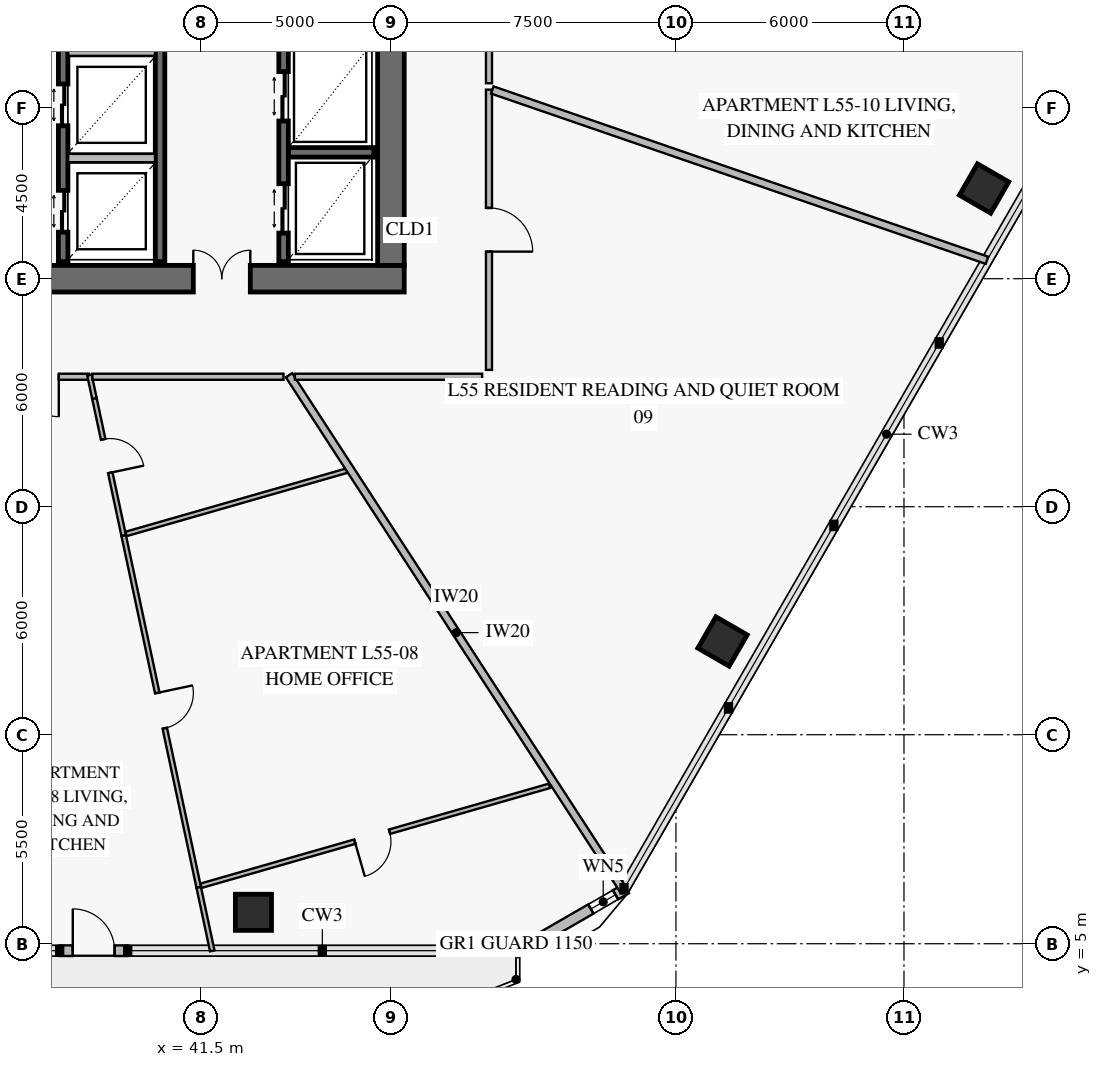
"""IFC4 building model, lengths in metres.
Left out: names, types, materials, properties, quantities, classifications, styles, units other than length and angle.
Written with IfcOpenShell. Run it as: python <this file> out.ifc"""

import sys

from ifc_helpers import new_model, si_unit, direction, frame, frame_2d, origin, origin_2d, place, context, subcontext, project, spatial, rectangle, extrude, element, fill, save


model = new_model("IFC4")
c1 = context("Model", 3, precision=1e-05, world=origin(), true_north=direction((0.0, 1.0)))
c2 = subcontext(c1, "Body", "Model", "MODEL_VIEW")
j1 = project(units=[si_unit("LENGTHUNIT", "METRE"), si_unit("PLANEANGLEUNIT", "RADIAN")], contexts=[c1])
p1 = place(None, origin())
s1 = spatial("IfcSite", under=j1, at=p1, CompositionType="ELEMENT")
p2 = place(p1, origin())
s2 = spatial("IfcBuilding", under=s1, at=p2, CompositionType="ELEMENT")
p3 = place(p2, frame((0.0, 0.0, 218.8)))
s3 = spatial("IfcBuildingStorey", under=s2, at=p3, CompositionType="ELEMENT", Elevation=218.8)
p4 = place(p3, frame((37.35, 22.5, 0.0), z_axis=(0.0, 0.0, 1.0), x_axis=(1.0, 0.0, 0.0)))
e1 = element("IfcWall", 1, at=p4, inside=s3, PredefinedType="SHEAR", context=c2, shape_type="SweptSolid", body=[
    extrude(rectangle(XDim=9.5, YDim=0.7, at=frame_2d((4.75, 0.0))), origin(), (0.0, 0.0, 1.0), 3.8),
])
p5 = place(p4, frame((3.95, 0.0, 0.0)))
e2 = element("IfcOpeningElement", 2, at=p5, cuts=e1, PredefinedType="OPENING", context=c2, shape_type="SweptSolid", body=[
    extrude(rectangle(XDim=1.5, YDim=2.15, at=frame_2d((0.75, 1.075))), frame((0.0, 0.362, 0.0), z_axis=(0.0, -1.0, 0.0), x_axis=(1.0, 0.0, 0.0)), (0.0, 0.0, 1.0), 0.724),
])
p6 = place(p3, frame((46.5, 22.85, 0.0), z_axis=(0.0, 0.0, 1.0), x_axis=(0.0, 1.0, 0.0)))
e3 = element("IfcWall", 3, at=p6, inside=s3, PredefinedType="SHEAR", context=c2, shape_type="SweptSolid", body=[
    extrude(rectangle(XDim=18.3, YDim=0.7, at=frame_2d((9.15, 0.0))), origin(), (0.0, 0.0, 1.0), 3.8),
])
p7 = place(p6, frame((8.9, 0.0, 0.0)))
e4 = element("IfcOpeningElement", 4, at=p7, cuts=e3, PredefinedType="OPENING", context=c2, shape_type="SweptSolid", body=[
    extrude(rectangle(XDim=1.1, YDim=2.15, at=frame_2d((0.55, 1.075))), frame((0.0, 0.362, 0.0), z_axis=(0.0, -1.0, 0.0), x_axis=(1.0, 0.0, 0.0)), (0.0, 0.0, 1.0), 0.724),
])
for number, where, z_axis, x_axis in (
    (5, (42.882, 5.827, 0.0), (0.0, 0.0, 1.0), (1.0, 0.0, 0.0)),
    (6, (55.226, 12.953, 0.0), (0.0, 0.0, 1.0), (0.5, 0.866, 0.0)),
    (7, (62.108, 24.874, 0.0), (0.0, 0.0, 1.0), (0.5, 0.866, 0.0)),
):
    element("IfcColumn", number, at=place(p3, frame(where, z_axis=z_axis, x_axis=x_axis)), inside=s3, PredefinedType="COLUMN", context=c2, shape_type="SweptSolid", body=[
        extrude(rectangle(XDim=0.95, YDim=0.95, at=origin_2d()), origin(), (0.0, 0.0, 1.0), 3.55),
    ])
p8 = place(p3, frame((52.693, 6.452, 0.0), z_axis=(0.0, 0.0, 1.0), x_axis=(-0.866020068361, -0.500009241111, 0.0)))
e8 = element("IfcWall", 8, at=p8, inside=s3, PredefinedType="SOLIDWALL", context=c2, shape_type="SweptSolid", body=[
    extrude(rectangle(XDim=3.365, YDim=0.28, at=frame_2d((1.683, 0.0))), origin(), (0.0, 0.0, 1.0), 3.55),
])
p9 = place(p8, frame((0.326, 0.0, 0.85)))
e9 = element("IfcOpeningElement", 9, at=p9, cuts=e8, PredefinedType="OPENING", context=c2, shape_type="SweptSolid", body=[
    extrude(rectangle(XDim=0.75, YDim=1.5, at=frame_2d((0.375, 0.75))), frame((0.0, 0.152, 0.0), z_axis=(0.0, -1.0, 0.0), x_axis=(1.0, 0.0, 0.0)), (0.0, 0.0, 1.0), 0.304),
])
p10 = place(p3, frame((39.573, 4.817, 0.0), z_axis=(0.0, 0.0, 1.0), x_axis=(-1.0, 0.0, 0.0)))
e10 = element("IfcWall", 10, at=p10, inside=s3, PredefinedType="SOLIDWALL", context=c2, shape_type="SweptSolid", body=[
    extrude(rectangle(XDim=1.79, YDim=0.28, at=frame_2d((0.895, 0.0))), origin(), (0.0, 0.0, 1.0), 3.55),
])
p11 = place(p10, frame((0.345, 0.0, 0.0)))
e11 = element("IfcOpeningElement", 11, at=p11, cuts=e10, PredefinedType="OPENING", context=c2, shape_type="SweptSolid", body=[
    extrude(rectangle(XDim=1.1, YDim=2.2, at=frame_2d((0.55, 1.1))), frame((0.0, 0.152, 0.0), z_axis=(0.0, -1.0, 0.0), x_axis=(1.0, 0.0, 0.0)), (0.0, 0.0, 1.0), 0.304),
])
p12 = place(p3, frame((37.875, 22.95, 0.0), z_axis=(0.0, 0.0, 1.0), x_axis=(0.0, 1.0, 0.0)))
e12 = element("IfcWall", 12, at=p12, inside=s3, PredefinedType="SOLIDWALL", context=c2, shape_type="SweptSolid", body=[
    extrude(rectangle(XDim=8.2, YDim=0.25, at=frame_2d((4.1, 0.0))), origin(), (0.0, 0.0, 1.0), 3.8),
])
p13 = place(p12, frame((0.775, 0.0, 0.0)))
e13 = element("IfcOpeningElement", 13, at=p13, cuts=e12, PredefinedType="OPENING", context=c2, shape_type="SweptSolid", body=[
    extrude(rectangle(XDim=1.1, YDim=2.2, at=frame_2d((0.55, 1.1))), frame((0.0, 0.137, 0.0), z_axis=(0.0, -1.0, 0.0), x_axis=(1.0, 0.0, 0.0)), (0.0, 0.0, 1.0), 0.274),
])
p14 = place(p12, frame((3.575, 0.0, 0.0)))
e14 = element("IfcOpeningElement", 14, at=p14, cuts=e12, PredefinedType="OPENING", context=c2, shape_type="SweptSolid", body=[
    extrude(rectangle(XDim=1.1, YDim=2.2, at=frame_2d((0.55, 1.1))), frame((0.0, 0.137, 0.0), z_axis=(0.0, -1.0, 0.0), x_axis=(1.0, 0.0, 0.0)), (0.0, 0.0, 1.0), 0.274),
])
p15 = place(p12, frame((6.375, 0.0, 0.0)))
e15 = element("IfcOpeningElement", 15, at=p15, cuts=e12, PredefinedType="OPENING", context=c2, shape_type="SweptSolid", body=[
    extrude(rectangle(XDim=1.1, YDim=2.2, at=frame_2d((0.55, 1.1))), frame((0.0, 0.137, 0.0), z_axis=(0.0, -1.0, 0.0), x_axis=(1.0, 0.0, 0.0)), (0.0, 0.0, 1.0), 0.274),
])
p16 = place(p3, frame((40.425, 22.95, 0.0), z_axis=(0.0, 0.0, 1.0), x_axis=(0.0, 1.0, 0.0)))
e16 = element("IfcWall", 16, at=p16, inside=s3, PredefinedType="SOLIDWALL", context=c2, shape_type="SweptSolid", body=[
    extrude(rectangle(XDim=8.2, YDim=0.25, at=frame_2d((4.1, 0.0))), origin(), (0.0, 0.0, 1.0), 3.8),
])
p17 = place(p3, frame((43.8, 25.825, 0.0), z_axis=(0.0, 0.0, 1.0), x_axis=(1.0, 0.0, 0.0)))
e17 = element("IfcWall", 17, at=p17, inside=s3, PredefinedType="SOLIDWALL", context=c2, shape_type="SweptSolid", body=[
    extrude(rectangle(XDim=2.25, YDim=0.25, at=frame_2d((1.125, 0.0))), origin(), (0.0, 0.0, 1.0), 3.8),
])
p18 = place(p3, frame((43.675, 22.95, 0.0), z_axis=(0.0, 0.0, 1.0), x_axis=(0.0, 1.0, 0.0)))
e18 = element("IfcWall", 18, at=p18, inside=s3, PredefinedType="SOLIDWALL", context=c2, shape_type="SweptSolid", body=[
    extrude(rectangle(XDim=8.2, YDim=0.25, at=frame_2d((4.1, 0.0))), origin(), (0.0, 0.0, 1.0), 3.8),
])
p19 = place(p18, frame((0.75, 0.0, 0.0)))
e19 = element("IfcOpeningElement", 19, at=p19, cuts=e18, PredefinedType="OPENING", context=c2, shape_type="SweptSolid", body=[
    extrude(rectangle(XDim=1.3, YDim=2.3, at=frame_2d((0.65, 1.15))), frame((0.0, 0.137, 0.0), z_axis=(0.0, -1.0, 0.0), x_axis=(1.0, 0.0, 0.0)), (0.0, 0.0, 1.0), 0.274),
])
p20 = place(p18, frame((3.7, 0.0, 0.0)))
e20 = element("IfcOpeningElement", 20, at=p20, cuts=e18, PredefinedType="OPENING", context=c2, shape_type="SweptSolid", body=[
    extrude(rectangle(XDim=1.3, YDim=2.3, at=frame_2d((0.65, 1.15))), frame((0.0, 0.137, 0.0), z_axis=(0.0, -1.0, 0.0), x_axis=(1.0, 0.0, 0.0)), (0.0, 0.0, 1.0), 0.274),
])
p21 = place(p18, frame((6.62, 0.0, 0.0)))
e21 = element("IfcOpeningElement", 21, at=p21, cuts=e18, PredefinedType="OPENING", context=c2, shape_type="SweptSolid", body=[
    extrude(rectangle(XDim=0.9, YDim=2.1, at=frame_2d((0.45, 1.05))), frame((0.0, 0.137, 0.0), z_axis=(0.0, -1.0, 0.0), x_axis=(1.0, 0.0, 0.0)), (0.0, 0.0, 1.0), 0.274),
])
p22 = place(p3, frame((38.698, 19.35, 0.0), z_axis=(0.0, 0.0, 1.0), x_axis=(0.208639315119, -0.97799265651, 0.0)))
e22 = element("IfcWall", 22, at=p22, inside=s3, PredefinedType="PARTITIONING", context=c2, shape_type="SweptSolid", body=[
    extrude(rectangle(XDim=3.692, YDim=0.12, at=frame_2d((1.846, 0.0))), origin(), (0.0, 0.0, 1.0), 3.55),
])
p23 = place(p22, frame((1.101, 0.0, 0.0)))
e23 = element("IfcOpeningElement", 23, at=p23, cuts=e22, PredefinedType="OPENING", context=c2, shape_type="SweptSolid", body=[
    extrude(rectangle(XDim=0.9, YDim=2.1, at=frame_2d((0.45, 1.05))), frame((0.0, 0.072, 0.0), z_axis=(0.0, -1.0, 0.0), x_axis=(1.0, 0.0, 0.0)), (0.0, 0.0, 1.0), 0.144),
])
p24 = place(p3, frame((39.468, 15.74, 0.0), z_axis=(0.0, 0.0, 1.0), x_axis=(0.208609525866, -0.977999011103, 0.0)))
e24 = element("IfcWall", 24, at=p24, inside=s3, PredefinedType="PARTITIONING", context=c2, shape_type="SweptSolid", body=[
    extrude(rectangle(XDim=9.466, YDim=0.12, at=frame_2d((4.733, 0.0))), origin(), (0.0, 0.0, 1.0), 3.15),
])
p25 = place(p24, frame((4.233, 0.0, 0.0)))
e25 = element("IfcOpeningElement", 25, at=p25, cuts=e24, PredefinedType="OPENING", context=c2, shape_type="SweptSolid", body=[
    extrude(rectangle(XDim=0.95, YDim=2.1, at=frame_2d((0.475, 1.05))), frame((0.0, 0.072, 0.0), z_axis=(0.0, -1.0, 0.0), x_axis=(1.0, 0.0, 0.0)), (0.0, 0.0, 1.0), 0.144),
])
p26 = place(p3, frame((41.503, 6.525, 0.0), z_axis=(0.0, 0.0, 1.0), x_axis=(0.961260813995, 0.2756404315, 0.0)))
e26 = element("IfcWall", 26, at=p26, inside=s3, PredefinedType="PARTITIONING", context=c2, shape_type="SweptSolid", body=[
    extrude(rectangle(XDim=9.539, YDim=0.12, at=frame_2d((4.77, 0.0))), origin(), (0.0, 0.0, 1.0), 2.87),
])
p27 = place(p26, frame((4.21, 0.0, 0.0)))
e27 = element("IfcOpeningElement", 27, at=p27, cuts=e26, PredefinedType="OPENING", context=c2, shape_type="SweptSolid", body=[
    extrude(rectangle(XDim=0.95, YDim=2.1, at=frame_2d((0.475, 1.05))), frame((0.0, 0.072, 0.0), z_axis=(0.0, -1.0, 0.0), x_axis=(1.0, 0.0, 0.0)), (0.0, 0.0, 1.0), 0.144),
])
p28 = place(p3, frame((35.915, 19.92, 0.0), z_axis=(0.0, 0.0, 1.0), x_axis=(1.0, 0.0, 0.0)))
e28 = element("IfcWall", 28, at=p28, inside=s3, PredefinedType="PARTITIONING", context=c2, shape_type="SweptSolid", body=[
    extrude(rectangle(XDim=2.641, YDim=0.16, at=frame_2d((1.321, 0.0))), origin(), (0.0, 0.0, 1.0), 3.55),
])
p29 = place(p28, frame((0.796, 0.0, 0.0)))
e29 = element("IfcOpeningElement", 29, at=p29, cuts=e28, PredefinedType="OPENING", context=c2, shape_type="SweptSolid", body=[
    extrude(rectangle(XDim=1.05, YDim=2.15, at=frame_2d((0.525, 1.075))), frame((0.0, 0.092, 0.0), z_axis=(0.0, -1.0, 0.0), x_axis=(1.0, 0.0, 0.0)), (0.0, 0.0, 1.0), 0.184),
])
p30 = place(p3, frame((49.08, 20.1, 0.0), z_axis=(0.0, 0.0, 1.0), x_axis=(0.0, 1.0, 0.0)))
e30 = element("IfcWall", 30, at=p30, inside=s3, PredefinedType="PARTITIONING", context=c2, shape_type="SweptSolid", body=[
    extrude(rectangle(XDim=7.375, YDim=0.16, at=frame_2d((3.688, 0.0))), origin(), (0.0, 0.0, 1.0), 3.55),
])
p31 = place(p30, frame((3.113, 0.0, 0.0)))
e31 = element("IfcOpeningElement", 31, at=p31, cuts=e30, PredefinedType="OPENING", context=c2, shape_type="SweptSolid", body=[
    extrude(rectangle(XDim=1.15, YDim=2.2, at=frame_2d((0.575, 1.1))), frame((0.0, 0.092, 0.0), z_axis=(0.0, -1.0, 0.0), x_axis=(1.0, 0.0, 0.0)), (0.0, 0.0, 1.0), 0.184),
])
p32 = place(p3, frame((49.08, 27.645, 0.0), z_axis=(0.0, 0.0, 1.0), x_axis=(0.0, 1.0, 0.0)))
e32 = element("IfcWall", 32, at=p32, inside=s3, PredefinedType="PARTITIONING", context=c2, shape_type="SweptSolid", body=[
    extrude(rectangle(XDim=3.32, YDim=0.16, at=frame_2d((1.66, 0.0))), origin(), (0.0, 0.0, 1.0), 2.9),
])
p33 = place(p32, frame((1.135, 0.0, 0.0)))
e33 = element("IfcOpeningElement", 33, at=p33, cuts=e32, PredefinedType="OPENING", context=c2, shape_type="SweptSolid", body=[
    extrude(rectangle(XDim=1.05, YDim=2.15, at=frame_2d((0.525, 1.075))), frame((0.0, 0.092, 0.0), z_axis=(0.0, -1.0, 0.0), x_axis=(1.0, 0.0, 0.0)), (0.0, 0.0, 1.0), 0.184),
])
for number, where, z_axis, x_axis in (
    (34, (38.008, 25.675, 0.0), (0.0, 0.0, 1.0), (1.0, 0.0, 0.0)),
    (35, (38.008, 28.475, 0.0), (0.0, 0.0, 1.0), (1.0, 0.0, 0.0)),
):
    element("IfcWall", number, at=place(p3, frame(where, z_axis=z_axis, x_axis=x_axis)), inside=s3, PredefinedType="PARTITIONING", context=c2, shape_type="SweptSolid", body=[
        extrude(rectangle(XDim=2.284, YDim=0.22, at=frame_2d((1.142, 0.0))), origin(), (0.0, 0.0, 1.0), 3.55),
    ])
p34 = place(p3, frame((38.567, 19.964, 0.0), z_axis=(0.0, 0.0, 1.0), x_axis=(0.208732655381, -0.977972739179, 0.0)))
e36 = element("IfcWall", 36, at=p34, inside=s3, PredefinedType="PARTITIONING", context=c2, shape_type="SweptSolid", body=[
    extrude(rectangle(XDim=0.628, YDim=0.12, at=frame_2d((0.314, 0.0))), origin(), (0.0, 0.0, 1.0), 3.55),
])
p35 = place(p3, frame((41.443, 6.482, 0.0), z_axis=(0.0, 0.0, 1.0), x_axis=(0.208581952585, -0.978004892143, 0.0)))
e37 = element("IfcWall", 37, at=p35, inside=s3, PredefinedType="PARTITIONING", context=c2, shape_type="SweptSolid", body=[
    extrude(rectangle(XDim=1.708, YDim=0.12, at=frame_2d((0.854, 0.0))), origin(), (0.0, 0.0, 1.0), 2.87),
])
p36 = place(p3, frame((39.529, 15.783, 0.0), z_axis=(0.0, 0.0, 1.0), x_axis=(0.961270836863, 0.275605475628, 0.0)))
e38 = element("IfcWall", 38, at=p36, inside=s3, PredefinedType="PARTITIONING", context=c2, shape_type="SweptSolid", body=[
    extrude(rectangle(XDim=6.088, YDim=0.12, at=frame_2d((3.044, 0.0))), origin(), (0.0, 0.0, 1.0), 2.9),
])
p37 = place(p3, frame((43.819, 19.96, 0.0), z_axis=(0.0, 0.0, 1.0), x_axis=(0.54463871909, -0.838670773109, 0.0)))
e39 = element("IfcWall", 39, at=p37, inside=s3, PredefinedType="PARTITIONING", context=c2, shape_type="SweptSolid", body=[
    extrude(rectangle(XDim=16.152, YDim=0.2, at=frame_2d((8.076, 0.0))), origin(), (0.0, 0.0, 1.0), 2.87),
])
p38 = place(p3, frame((49.168, 27.466, 0.0), z_axis=(0.0, 0.0, 1.0), x_axis=(0.945519149225, -0.325566488523, 0.0)))
e40 = element("IfcWall", 40, at=p38, inside=s3, PredefinedType="PARTITIONING", context=c2, shape_type="SweptSolid", body=[
    extrude(rectangle(XDim=13.765, YDim=0.2, at=frame_2d((6.883, 0.0))), origin(), (0.0, 0.0, 1.0), 2.87),
])
p39 = place(p3, frame((38.646, 19.92, 0.0), z_axis=(0.0, 0.0, 1.0), x_axis=(1.0, 0.0, 0.0)))
e41 = element("IfcWall", 41, at=p39, inside=s3, PredefinedType="PARTITIONING", context=c2, shape_type="SweptSolid", body=[
    extrude(rectangle(XDim=5.026, YDim=0.16, at=frame_2d((2.513, 0.0))), origin(), (0.0, 0.0, 1.0), 2.9),
])
p40 = place(p3, frame((43.974, 19.92, 0.0), z_axis=(0.0, 0.0, 1.0), x_axis=(1.0, 0.0, 0.0)))
e42 = element("IfcWall", 42, at=p40, inside=s3, PredefinedType="PARTITIONING", context=c2, shape_type="SweptSolid", body=[
    extrude(rectangle(XDim=4.926, YDim=0.16, at=frame_2d((2.463, 0.0))), origin(), (0.0, 0.0, 1.0), 2.9),
])
p41 = place(p9, origin())
e43 = element("IfcWindow", 43, at=p41, inside=s3, PartitioningType="SINGLE_PANEL", PredefinedType="WINDOW", context=c2, shape_type="SweptSolid", body=[
    extrude(rectangle(XDim=0.75, YDim=1.5, at=frame_2d((0.375, 0.75))), frame((0.0, 0.03, 0.0), z_axis=(0.0, -1.0, 0.0), x_axis=(1.0, 0.0, 0.0)), (0.0, 0.0, 1.0), 0.06),
])
fill(e9, e43)
p42 = place(p11, frame((1.1, 0.0, 0.0), z_axis=(0.0, 0.0, 1.0), x_axis=(-1.0, 0.0, 0.0)))
e44 = element("IfcDoor", 44, at=p42, inside=s3, OperationType="SINGLE_SWING_LEFT", PredefinedType="DOOR", context=c2, shape_type="SweptSolid", body=[
    extrude(rectangle(XDim=1.1, YDim=2.2, at=frame_2d((0.55, 1.1))), frame((0.0, 0.025, 0.0), z_axis=(0.0, -1.0, 0.0), x_axis=(1.0, 0.0, 0.0)), (0.0, 0.0, 1.0), 0.05),
])
fill(e11, e44)
p43 = place(p5, origin())
e45 = element("IfcDoor", 45, at=p43, inside=s3, OperationType="DOUBLE_DOOR_SINGLE_SWING", PredefinedType="DOOR", context=c2, shape_type="SweptSolid", body=[
    extrude(rectangle(XDim=1.5, YDim=2.15, at=frame_2d((0.75, 1.075))), frame((0.0, 0.025, 0.0), z_axis=(0.0, -1.0, 0.0), x_axis=(1.0, 0.0, 0.0)), (0.0, 0.0, 1.0), 0.05),
])
fill(e2, e45)
p44 = place(p13, origin())
e46 = element("IfcDoor", 46, at=p44, inside=s3, OperationType="DOUBLE_DOOR_SLIDING", PredefinedType="DOOR", context=c2, shape_type="SweptSolid", body=[
    extrude(rectangle(XDim=1.1, YDim=2.2, at=frame_2d((0.55, 1.1))), frame((0.0, 0.025, 0.0), z_axis=(0.0, -1.0, 0.0), x_axis=(1.0, 0.0, 0.0)), (0.0, 0.0, 1.0), 0.05),
])
fill(e13, e46)
p45 = place(p14, origin())
e47 = element("IfcDoor", 47, at=p45, inside=s3, OperationType="DOUBLE_DOOR_SLIDING", PredefinedType="DOOR", context=c2, shape_type="SweptSolid", body=[
    extrude(rectangle(XDim=1.1, YDim=2.2, at=frame_2d((0.55, 1.1))), frame((0.0, 0.025, 0.0), z_axis=(0.0, -1.0, 0.0), x_axis=(1.0, 0.0, 0.0)), (0.0, 0.0, 1.0), 0.05),
])
fill(e14, e47)
p46 = place(p19, origin())
e48 = element("IfcDoor", 48, at=p46, inside=s3, OperationType="DOUBLE_DOOR_SLIDING", PredefinedType="DOOR", context=c2, shape_type="SweptSolid", body=[
    extrude(rectangle(XDim=1.3, YDim=2.3, at=frame_2d((0.65, 1.15))), frame((0.0, 0.025, 0.0), z_axis=(0.0, -1.0, 0.0), x_axis=(1.0, 0.0, 0.0)), (0.0, 0.0, 1.0), 0.05),
])
fill(e19, e48)
p47 = place(p20, origin())
e49 = element("IfcDoor", 49, at=p47, inside=s3, OperationType="DOUBLE_DOOR_SLIDING", PredefinedType="DOOR", context=c2, shape_type="SweptSolid", body=[
    extrude(rectangle(XDim=1.3, YDim=2.3, at=frame_2d((0.65, 1.15))), frame((0.0, 0.025, 0.0), z_axis=(0.0, -1.0, 0.0), x_axis=(1.0, 0.0, 0.0)), (0.0, 0.0, 1.0), 0.05),
])
fill(e20, e49)
p48 = place(p23, origin())
e50 = element("IfcDoor", 50, at=p48, inside=s3, OperationType="SINGLE_SWING_RIGHT", PredefinedType="DOOR", context=c2, shape_type="SweptSolid", body=[
    extrude(rectangle(XDim=0.9, YDim=2.1, at=frame_2d((0.45, 1.05))), frame((0.0, 0.025, 0.0), z_axis=(0.0, -1.0, 0.0), x_axis=(1.0, 0.0, 0.0)), (0.0, 0.0, 1.0), 0.05),
])
fill(e23, e50)
p49 = place(p25, origin())
e51 = element("IfcDoor", 51, at=p49, inside=s3, OperationType="SINGLE_SWING_LEFT", PredefinedType="DOOR", context=c2, shape_type="SweptSolid", body=[
    extrude(rectangle(XDim=0.95, YDim=2.1, at=frame_2d((0.475, 1.05))), frame((0.0, 0.025, 0.0), z_axis=(0.0, -1.0, 0.0), x_axis=(1.0, 0.0, 0.0)), (0.0, 0.0, 1.0), 0.05),
])
fill(e25, e51)
p50 = place(p27, frame((0.95, 0.0, 0.0), z_axis=(0.0, 0.0, 1.0), x_axis=(-1.0, 0.0, 0.0)))
e52 = element("IfcDoor", 52, at=p50, inside=s3, OperationType="SINGLE_SWING_RIGHT", PredefinedType="DOOR", context=c2, shape_type="SweptSolid", body=[
    extrude(rectangle(XDim=0.95, YDim=2.1, at=frame_2d((0.475, 1.05))), frame((0.0, 0.025, 0.0), z_axis=(0.0, -1.0, 0.0), x_axis=(1.0, 0.0, 0.0)), (0.0, 0.0, 1.0), 0.05),
])
fill(e27, e52)
p51 = place(p29, frame((1.05, 0.0, 0.0), z_axis=(0.0, 0.0, 1.0), x_axis=(-1.0, 0.0, 0.0)))
e53 = element("IfcDoor", 53, at=p51, inside=s3, OperationType="SINGLE_SWING_LEFT", PredefinedType="DOOR", context=c2, shape_type="SweptSolid", body=[
    extrude(rectangle(XDim=1.05, YDim=2.15, at=frame_2d((0.525, 1.075))), frame((0.0, 0.025, 0.0), z_axis=(0.0, -1.0, 0.0), x_axis=(1.0, 0.0, 0.0)), (0.0, 0.0, 1.0), 0.05),
])
fill(e29, e53)
p52 = place(p31, frame((1.15, 0.0, 0.0), z_axis=(0.0, 0.0, 1.0), x_axis=(-1.0, 0.0, 0.0)))
e54 = element("IfcDoor", 54, at=p52, inside=s3, OperationType="SINGLE_SWING_RIGHT", PredefinedType="DOOR", context=c2, shape_type="SweptSolid", body=[
    extrude(rectangle(XDim=1.15, YDim=2.2, at=frame_2d((0.575, 1.1))), frame((0.0, 0.025, 0.0), z_axis=(0.0, -1.0, 0.0), x_axis=(1.0, 0.0, 0.0)), (0.0, 0.0, 1.0), 0.05),
])
fill(e31, e54)
save(model, sys.argv[1])
